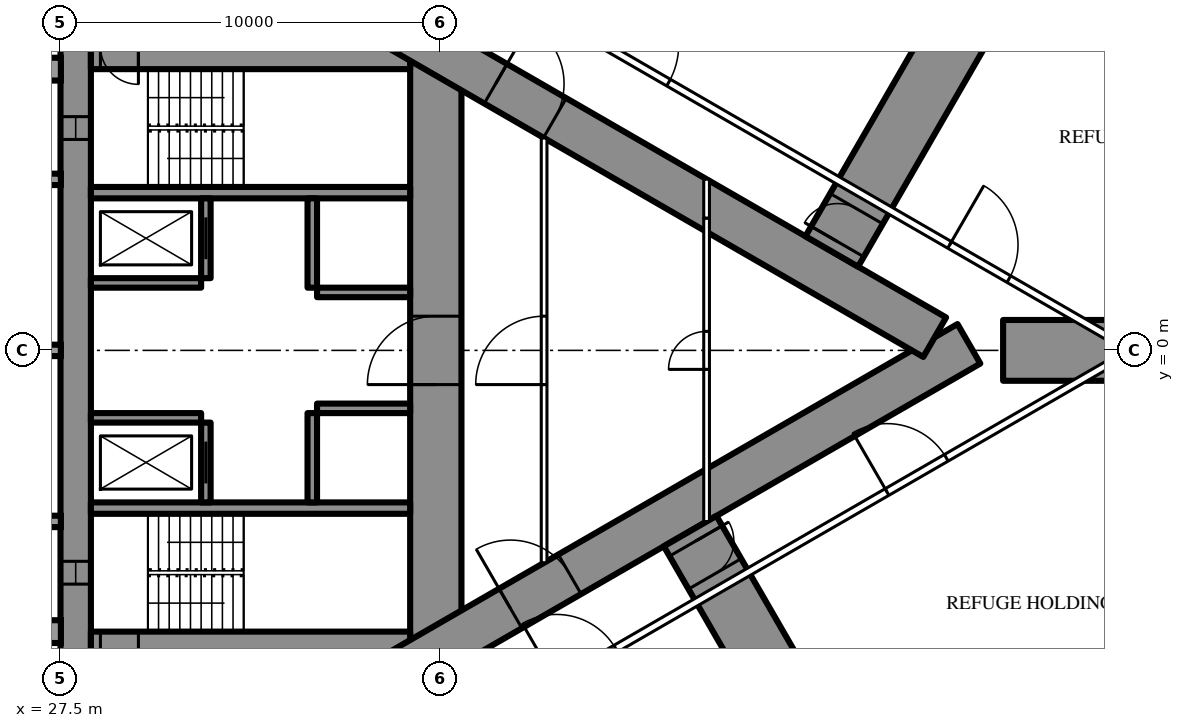
"""IFC4 building model, lengths in metres.
Left out: names, types, materials, properties, quantities, classifications, styles, units other than length and angle.
Written with IfcOpenShell. Run it as: python <this file> out.ifc"""

import sys

from ifc_helpers import new_model, si_unit, direction, frame, frame_2d, origin, place, context, subcontext, project, spatial, rectangle, extrude, element, fill, save


model = new_model("IFC4")
c1 = context("Model", 3, precision=1e-05, world=origin(), true_north=direction((0.0, 1.0)))
c2 = subcontext(c1, "Body", "Model", "MODEL_VIEW")
j1 = project(units=[si_unit("LENGTHUNIT", "METRE"), si_unit("PLANEANGLEUNIT", "RADIAN")], contexts=[c1])
p1 = place(None, origin())
s1 = spatial("IfcSite", under=j1, at=p1, CompositionType="ELEMENT")
p2 = place(p1, origin())
s2 = spatial("IfcBuilding", under=s1, at=p2, CompositionType="ELEMENT")
p3 = place(p2, frame((0.0, 0.0, 87.0)))
s3 = spatial("IfcBuildingStorey", under=s2, at=p3, CompositionType="ELEMENT", Elevation=87.0)
p4 = place(p3, frame((27.9, -8.6, 0.0), z_axis=(0.0, 0.0, 1.0), x_axis=(0.0, 1.0, 0.0)))
e1 = element("IfcWall", 1, at=p4, inside=s3, PredefinedType="SHEAR", context=c2, shape_type="SweptSolid", body=[
    extrude(rectangle(XDim=17.2, YDim=0.8, at=frame_2d((8.6, 0.0))), origin(), (0.0, 0.0, 1.0), 3.6),
])
p5 = place(p4, frame((2.45, 0.0, 0.6)))
e2 = element("IfcOpeningElement", 2, at=p5, cuts=e1, PredefinedType="OPENING", context=c2, shape_type="SweptSolid", body=[
    extrude(rectangle(XDim=0.6, YDim=2.1, at=frame_2d((0.3, 1.05))), frame((0.0, 0.41, 0.0), z_axis=(0.0, -1.0, 0.0), x_axis=(1.0, 0.0, 0.0)), (0.0, 0.0, 1.0), 0.82),
])
p6 = place(p4, frame((14.15, 0.0, 0.6)))
e3 = element("IfcOpeningElement", 3, at=p6, cuts=e1, PredefinedType="OPENING", context=c2, shape_type="SweptSolid", body=[
    extrude(rectangle(XDim=0.6, YDim=2.1, at=frame_2d((0.3, 1.05))), frame((0.0, 0.41, 0.0), z_axis=(0.0, -1.0, 0.0), x_axis=(1.0, 0.0, 0.0)), (0.0, 0.0, 1.0), 0.82),
])
p7 = place(p3, frame((37.375, -8.6, 0.0), z_axis=(0.0, 0.0, 1.0), x_axis=(0.0, 1.0, 0.0)))
e4 = element("IfcWall", 4, at=p7, inside=s3, PredefinedType="SHEAR", context=c2, shape_type="SweptSolid", body=[
    extrude(rectangle(XDim=17.2, YDim=1.35, at=frame_2d((8.6, 0.0))), origin(), (0.0, 0.0, 1.0), 3.6),
])
p8 = place(p7, frame((7.7, 0.0, 0.0)))
e5 = element("IfcOpeningElement", 5, at=p8, cuts=e4, PredefinedType="OPENING", context=c2, shape_type="SweptSolid", body=[
    extrude(rectangle(XDim=1.8, YDim=2.2, at=frame_2d((0.9, 1.1))), frame((0.0, 0.685, 0.0), z_axis=(0.0, -1.0, 0.0), x_axis=(1.0, 0.0, 0.0)), (0.0, 0.0, 1.0), 1.37),
])
p9 = place(p3, frame((28.3, -8.0, 0.0), z_axis=(0.0, 0.0, 1.0), x_axis=(1.0, 0.0, 0.0)))
e6 = element("IfcWall", 6, at=p9, inside=s3, PredefinedType="SHEAR", context=c2, shape_type="SweptSolid", body=[
    extrude(rectangle(XDim=8.4, YDim=1.2, at=frame_2d((4.2, 0.0))), origin(), (0.0, 0.0, 1.0), 3.6),
])
p10 = place(p9, frame((0.25, 0.0, 0.0)))
e7 = element("IfcOpeningElement", 7, at=p10, cuts=e6, PredefinedType="OPENING", context=c2, shape_type="SweptSolid", body=[
    extrude(rectangle(XDim=1.0, YDim=2.2, at=frame_2d((0.5, 1.1))), frame((0.0, 0.61, 0.0), z_axis=(0.0, -1.0, 0.0), x_axis=(1.0, 0.0, 0.0)), (0.0, 0.0, 1.0), 1.22),
])
p11 = place(p3, frame((28.3, 8.0, 0.0), z_axis=(0.0, 0.0, 1.0), x_axis=(1.0, 0.0, 0.0)))
e8 = element("IfcWall", 8, at=p11, inside=s3, PredefinedType="SHEAR", context=c2, shape_type="SweptSolid", body=[
    extrude(rectangle(XDim=8.4, YDim=1.2, at=frame_2d((4.2, 0.0))), origin(), (0.0, 0.0, 1.0), 3.6),
])
p12 = place(p11, frame((0.25, 0.0, 0.0)))
e9 = element("IfcOpeningElement", 9, at=p12, cuts=e8, PredefinedType="OPENING", context=c2, shape_type="SweptSolid", body=[
    extrude(rectangle(XDim=1.0, YDim=2.2, at=frame_2d((0.5, 1.1))), frame((0.0, 0.61, 0.0), z_axis=(0.0, -1.0, 0.0), x_axis=(1.0, 0.0, 0.0)), (0.0, 0.0, 1.0), 1.22),
])
for number, where, z_axis, x_axis in (
    (10, (28.3, -4.15, 0.0), (0.0, 0.0, 1.0), (1.0, 0.0, 0.0)),
    (11, (28.3, 4.15, 0.0), (0.0, 0.0, 1.0), (1.0, 0.0, 0.0)),
):
    element("IfcWall", number, at=place(p3, frame(where, z_axis=z_axis, x_axis=x_axis)), inside=s3, PredefinedType="SHEAR", context=c2, shape_type="SweptSolid", body=[
        extrude(rectangle(XDim=8.4, YDim=0.3, at=frame_2d((4.2, 0.0))), origin(), (0.0, 0.0, 1.0), 3.6),
    ])
p13 = place(p3, frame((31.325, -4.0, 0.0), z_axis=(0.0, 0.0, 1.0), x_axis=(0.0, 1.0, 0.0)))
e12 = element("IfcWall", 12, at=p13, inside=s3, PredefinedType="SHEAR", context=c2, shape_type="SweptSolid", body=[
    extrude(rectangle(XDim=2.1, YDim=0.25, at=frame_2d((1.05, 0.0))), origin(), (0.0, 0.0, 1.0), 3.6),
])
p14 = place(p13, frame((0.5, 0.0, 0.0)))
e13 = element("IfcOpeningElement", 13, at=p14, cuts=e12, PredefinedType="OPENING", context=c2, shape_type="SweptSolid", body=[
    extrude(rectangle(XDim=1.1, YDim=2.2, at=frame_2d((0.55, 1.1))), frame((0.0, 0.135, 0.0), z_axis=(0.0, -1.0, 0.0), x_axis=(1.0, 0.0, 0.0)), (0.0, 0.0, 1.0), 0.27),
])
p15 = place(p3, frame((34.125, -4.0, 0.0), z_axis=(0.0, 0.0, 1.0), x_axis=(0.0, 1.0, 0.0)))
e14 = element("IfcWall", 14, at=p15, inside=s3, PredefinedType="SHEAR", context=c2, shape_type="SweptSolid", body=[
    extrude(rectangle(XDim=2.35, YDim=0.25, at=frame_2d((1.175, 0.0))), origin(), (0.0, 0.0, 1.0), 3.6),
])
p16 = place(p3, frame((28.3, -1.775, 0.0), z_axis=(0.0, 0.0, 1.0), x_axis=(1.0, 0.0, 0.0)))
e15 = element("IfcWall", 15, at=p16, inside=s3, PredefinedType="SHEAR", context=c2, shape_type="SweptSolid", body=[
    extrude(rectangle(XDim=2.9, YDim=0.25, at=frame_2d((1.45, 0.0))), origin(), (0.0, 0.0, 1.0), 3.6),
])
p17 = place(p3, frame((34.25, -1.525, 0.0), z_axis=(0.0, 0.0, 1.0), x_axis=(1.0, 0.0, 0.0)))
e16 = element("IfcWall", 16, at=p17, inside=s3, PredefinedType="SHEAR", context=c2, shape_type="SweptSolid", body=[
    extrude(rectangle(XDim=2.45, YDim=0.25, at=frame_2d((1.225, 0.0))), origin(), (0.0, 0.0, 1.0), 3.6),
])
p18 = place(p3, frame((31.325, 1.9, 0.0), z_axis=(0.0, 0.0, 1.0), x_axis=(0.0, 1.0, 0.0)))
e17 = element("IfcWall", 17, at=p18, inside=s3, PredefinedType="SHEAR", context=c2, shape_type="SweptSolid", body=[
    extrude(rectangle(XDim=2.1, YDim=0.25, at=frame_2d((1.05, 0.0))), origin(), (0.0, 0.0, 1.0), 3.6),
])
p19 = place(p18, frame((0.5, 0.0, 0.0)))
e18 = element("IfcOpeningElement", 18, at=p19, cuts=e17, PredefinedType="OPENING", context=c2, shape_type="SweptSolid", body=[
    extrude(rectangle(XDim=1.1, YDim=2.2, at=frame_2d((0.55, 1.1))), frame((0.0, 0.135, 0.0), z_axis=(0.0, -1.0, 0.0), x_axis=(1.0, 0.0, 0.0)), (0.0, 0.0, 1.0), 0.27),
])
p20 = place(p3, frame((34.125, 1.65, 0.0), z_axis=(0.0, 0.0, 1.0), x_axis=(0.0, 1.0, 0.0)))
e19 = element("IfcWall", 19, at=p20, inside=s3, PredefinedType="SHEAR", context=c2, shape_type="SweptSolid", body=[
    extrude(rectangle(XDim=2.35, YDim=0.25, at=frame_2d((1.175, 0.0))), origin(), (0.0, 0.0, 1.0), 3.6),
])
p21 = place(p3, frame((28.3, 1.775, 0.0), z_axis=(0.0, 0.0, 1.0), x_axis=(1.0, 0.0, 0.0)))
e20 = element("IfcWall", 20, at=p21, inside=s3, PredefinedType="SHEAR", context=c2, shape_type="SweptSolid", body=[
    extrude(rectangle(XDim=2.9, YDim=0.25, at=frame_2d((1.45, 0.0))), origin(), (0.0, 0.0, 1.0), 3.6),
])
p22 = place(p3, frame((34.25, 1.525, 0.0), z_axis=(0.0, 0.0, 1.0), x_axis=(1.0, 0.0, 0.0)))
e21 = element("IfcWall", 21, at=p22, inside=s3, PredefinedType="SHEAR", context=c2, shape_type="SweptSolid", body=[
    extrude(rectangle(XDim=2.45, YDim=0.25, at=frame_2d((1.225, 0.0))), origin(), (0.0, 0.0, 1.0), 3.6),
])
p23 = place(p3, frame((27.2, -13.8, 0.0), z_axis=(0.0, 0.0, 1.0), x_axis=(0.866027159892, 0.499996958321, 0.0)))
e22 = element("IfcWall", 22, at=p23, inside=s3, PredefinedType="SHEAR", context=c2, shape_type="SweptSolid", body=[
    extrude(rectangle(XDim=27.947, YDim=1.2, at=frame_2d((13.973, 0.0))), origin(), (0.0, 0.0, 1.0), 3.6),
])
p24 = place(p23, frame((4.6, 0.0, 0.0)))
e23 = element("IfcOpeningElement", 23, at=p24, cuts=e22, PredefinedType="OPENING", context=c2, shape_type="SweptSolid", body=[
    extrude(rectangle(XDim=1.0, YDim=2.2, at=frame_2d((0.5, 1.1))), frame((0.0, 0.61, 0.0), z_axis=(0.0, -1.0, 0.0), x_axis=(1.0, 0.0, 0.0)), (0.0, 0.0, 1.0), 1.22),
])
p25 = place(p23, frame((14.018, 0.0, 0.0)))
e24 = element("IfcOpeningElement", 24, at=p25, cuts=e22, PredefinedType="OPENING", context=c2, shape_type="SweptSolid", body=[
    extrude(rectangle(XDim=1.8, YDim=2.2, at=frame_2d((0.9, 1.1))), frame((0.0, 0.61, 0.0), z_axis=(0.0, -1.0, 0.0), x_axis=(1.0, 0.0, 0.0)), (0.0, 0.0, 1.0), 1.22),
])
p26 = place(p3, frame((27.2, 13.8, 0.0), z_axis=(0.0, 0.0, 1.0), x_axis=(0.866024515034, -0.500001539357, 0.0)))
e25 = element("IfcWall", 25, at=p26, inside=s3, PredefinedType="SHEAR", context=c2, shape_type="SweptSolid", body=[
    extrude(rectangle(XDim=26.907, YDim=1.2, at=frame_2d((13.454, 0.0))), origin(), (0.0, 0.0, 1.0), 3.6),
])
p27 = place(p26, frame((5.95, 0.0, 0.0)))
e26 = element("IfcOpeningElement", 26, at=p27, cuts=e25, PredefinedType="OPENING", context=c2, shape_type="SweptSolid", body=[
    extrude(rectangle(XDim=1.0, YDim=2.2, at=frame_2d((0.5, 1.1))), frame((0.0, 0.61, 0.0), z_axis=(0.0, -1.0, 0.0), x_axis=(1.0, 0.0, 0.0)), (0.0, 0.0, 1.0), 1.22),
])
p28 = place(p26, frame((13.568, 0.0, 0.0)))
e27 = element("IfcOpeningElement", 27, at=p28, cuts=e25, PredefinedType="OPENING", context=c2, shape_type="SweptSolid", body=[
    extrude(rectangle(XDim=1.8, YDim=2.03, at=frame_2d((0.9, 1.015))), frame((0.0, 0.61, 0.0), z_axis=(0.0, -1.0, 0.0), x_axis=(1.0, 0.0, 0.0)), (0.0, 0.0, 1.0), 1.22),
])
p29 = place(p3, frame((44.067, -4.754, 0.0), z_axis=(0.0, 0.0, 1.0), x_axis=(0.499987574995, -0.866032577246, 0.0)))
e28 = element("IfcWall", 28, at=p29, inside=s3, PredefinedType="SHEAR", context=c2, shape_type="SweptSolid", body=[
    extrude(rectangle(XDim=11.824, YDim=1.6, at=frame_2d((5.912, 0.0))), origin(), (0.0, 0.0, 1.0), 3.6),
])
p30 = place(p29, frame((0.3, 0.0, 0.0)))
e29 = element("IfcOpeningElement", 29, at=p30, cuts=e28, PredefinedType="OPENING", context=c2, shape_type="SweptSolid", body=[
    extrude(rectangle(XDim=1.0, YDim=2.2, at=frame_2d((0.5, 1.1))), frame((0.0, 0.81, 0.0), z_axis=(0.0, -1.0, 0.0), x_axis=(1.0, 0.0, 0.0)), (0.0, 0.0, 1.0), 1.62),
])
p31 = place(p3, frame((52.302, 0.0, 0.0), z_axis=(0.0, 0.0, 1.0), x_axis=(1.0, 0.0, 0.0)))
e30 = element("IfcWall", 30, at=p31, inside=s3, PredefinedType="SHEAR", context=c2, shape_type="SweptSolid", body=[
    extrude(rectangle(XDim=9.198, YDim=1.6, at=frame_2d((4.599, 0.0))), origin(), (0.0, 0.0, 1.0), 3.6),
])
p32 = place(p3, frame((47.794, 2.603, 0.0), z_axis=(0.0, 0.0, 1.0), x_axis=(0.499993342329, 0.866029247559, 0.0)))
e31 = element("IfcWall", 31, at=p32, inside=s3, PredefinedType="SHEAR", context=c2, shape_type="SweptSolid", body=[
    extrude(rectangle(XDim=11.806, YDim=1.6, at=frame_2d((5.903, 0.0))), origin(), (0.0, 0.0, 1.0), 3.6),
])
p33 = place(p32, frame((0.3, 0.0, 0.0)))
e32 = element("IfcOpeningElement", 32, at=p33, cuts=e31, PredefinedType="OPENING", context=c2, shape_type="SweptSolid", body=[
    extrude(rectangle(XDim=1.0, YDim=2.2, at=frame_2d((0.5, 1.1))), frame((0.0, 0.81, 0.0), z_axis=(0.0, -1.0, 0.0), x_axis=(1.0, 0.0, 0.0)), (0.0, 0.0, 1.0), 1.62),
])
p34 = place(p3, frame((49.979, -14.994, 0.0), z_axis=(0.0, 0.0, 1.0), x_axis=(0.849312372751, 0.527890607505, 0.0)))
e33 = element("IfcWall", 33, at=p34, inside=s3, PredefinedType="SHEAR", context=c2, shape_type="SweptSolid", body=[
    extrude(rectangle(XDim=12.906, YDim=1.4, at=frame_2d((6.453, 0.0))), origin(), (0.0, 0.0, 1.0), 3.6),
])
p35 = place(p34, frame((4.953, 0.0, 0.6)))
e34 = element("IfcOpeningElement", 34, at=p35, cuts=e33, PredefinedType="OPENING", context=c2, shape_type="SweptSolid", body=[
    extrude(rectangle(XDim=3.0, YDim=1.2, at=frame_2d((1.5, 0.6))), frame((0.0, 0.71, 0.0), z_axis=(0.0, -1.0, 0.0), x_axis=(1.0, 0.0, 0.0)), (0.0, 0.0, 1.0), 1.42),
])
p36 = place(p3, frame((60.941, 8.181, 0.0), z_axis=(0.0, 0.0, 1.0), x_axis=(-0.841727408736, 0.539902740669, 0.0)))
e35 = element("IfcWall", 35, at=p36, inside=s3, PredefinedType="SHEAR", context=c2, shape_type="SweptSolid", body=[
    extrude(rectangle(XDim=8.606, YDim=1.4, at=frame_2d((4.303, 0.0))), origin(), (0.0, 0.0, 1.0), 3.6),
])
p37 = place(p36, frame((2.803, 0.0, 0.6)))
e36 = element("IfcOpeningElement", 36, at=p37, cuts=e35, PredefinedType="OPENING", context=c2, shape_type="SweptSolid", body=[
    extrude(rectangle(XDim=3.0, YDim=1.2, at=frame_2d((1.5, 0.6))), frame((0.0, 0.71, 0.0), z_axis=(0.0, -1.0, 0.0), x_axis=(1.0, 0.0, 0.0)), (0.0, 0.0, 1.0), 1.42),
])
p38 = place(p3, frame((37.96, -10.243, 0.0), z_axis=(0.0, 0.0, 1.0), x_axis=(0.866026429433, 0.499998223521, 0.0)))
e37 = element("IfcWall", 37, at=p38, inside=s3, PredefinedType="PARTITIONING", context=c2, shape_type="SweptSolid", body=[
    extrude(rectangle(XDim=20.487, YDim=0.2, at=frame_2d((10.243, 0.0))), origin(), (0.0, 0.0, 1.0), 3.35),
])
p39 = place(p38, frame((13.034, 0.0, 0.0)))
e38 = element("IfcOpeningElement", 38, at=p39, cuts=e37, PredefinedType="OPENING", context=c2, shape_type="SweptSolid", body=[
    extrude(rectangle(XDim=1.8, YDim=2.2, at=frame_2d((0.9, 1.1))), frame((0.0, 0.11, 0.0), z_axis=(0.0, -1.0, 0.0), x_axis=(1.0, 0.0, 0.0)), (0.0, 0.0, 1.0), 0.22),
])
p40 = place(p38, frame((2.992, 0.0, 0.0)))
e39 = element("IfcOpeningElement", 39, at=p40, cuts=e37, PredefinedType="OPENING", context=c2, shape_type="SweptSolid", body=[
    extrude(rectangle(XDim=1.8, YDim=2.2, at=frame_2d((0.9, 1.1))), frame((0.0, 0.11, 0.0), z_axis=(0.0, -1.0, 0.0), x_axis=(1.0, 0.0, 0.0)), (0.0, 0.0, 1.0), 0.22),
])
p41 = place(p3, frame((36.834, 10.894, 0.0), z_axis=(0.0, 0.0, 1.0), x_axis=(0.866028157229, -0.499995230863, 0.0)))
e40 = element("IfcWall", 40, at=p41, inside=s3, PredefinedType="PARTITIONING", context=c2, shape_type="SweptSolid", body=[
    extrude(rectangle(XDim=21.667, YDim=0.2, at=frame_2d((10.833, 0.0))), origin(), (0.0, 0.0, 1.0), 3.35),
])
p42 = place(p41, frame((16.236, 0.0, 0.0)))
e41 = element("IfcOpeningElement", 41, at=p42, cuts=e40, PredefinedType="OPENING", context=c2, shape_type="SweptSolid", body=[
    extrude(rectangle(XDim=1.8, YDim=2.2, at=frame_2d((0.9, 1.1))), frame((0.0, 0.11, 0.0), z_axis=(0.0, -1.0, 0.0), x_axis=(1.0, 0.0, 0.0)), (0.0, 0.0, 1.0), 0.22),
])
p43 = place(p41, frame((5.696, 0.0, 0.0)))
e42 = element("IfcOpeningElement", 42, at=p43, cuts=e40, PredefinedType="OPENING", context=c2, shape_type="SweptSolid", body=[
    extrude(rectangle(XDim=2.0, YDim=2.4, at=frame_2d((1.0, 1.2))), frame((0.0, 0.11, 0.0), z_axis=(0.0, -1.0, 0.0), x_axis=(1.0, 0.0, 0.0)), (0.0, 0.0, 1.0), 0.22),
])
p44 = place(p3, frame((40.225, -5.587, 0.0), z_axis=(0.0, 0.0, 1.0), x_axis=(0.0, 1.0, 0.0)))
e43 = element("IfcWall", 43, at=p44, inside=s3, PredefinedType="PARTITIONING", context=c2, shape_type="SweptSolid", body=[
    extrude(rectangle(XDim=11.174, YDim=0.15, at=frame_2d((5.587, 0.0))), origin(), (0.0, 0.0, 1.0), 3.35),
])
p45 = place(p44, frame((4.687, 0.0, 0.0)))
e44 = element("IfcOpeningElement", 44, at=p45, cuts=e43, PredefinedType="OPENING", context=c2, shape_type="SweptSolid", body=[
    extrude(rectangle(XDim=1.8, YDim=2.2, at=frame_2d((0.9, 1.1))), frame((0.0, 0.085, 0.0), z_axis=(0.0, -1.0, 0.0), x_axis=(1.0, 0.0, 0.0)), (0.0, 0.0, 1.0), 0.17),
])
p46 = place(p3, frame((44.5, -4.505, 0.0), z_axis=(0.0, 0.0, 1.0), x_axis=(0.0, 1.0, 0.0)))
e45 = element("IfcWall", 45, at=p46, inside=s3, PredefinedType="PARTITIONING", context=c2, shape_type="SweptSolid", body=[
    extrude(rectangle(XDim=7.986, YDim=0.15, at=frame_2d((3.993, 0.0))), origin(), (0.0, 0.0, 1.0), 3.35),
])
p47 = place(p46, frame((4.005, 0.0, 0.0)))
e46 = element("IfcOpeningElement", 46, at=p47, cuts=e45, PredefinedType="OPENING", context=c2, shape_type="SweptSolid", body=[
    extrude(rectangle(XDim=1.0, YDim=2.2, at=frame_2d((0.5, 1.1))), frame((0.0, 0.085, 0.0), z_axis=(0.0, -1.0, 0.0), x_axis=(1.0, 0.0, 0.0)), (0.0, 0.0, 1.0), 0.17),
])
p48 = place(p3, frame((44.5, 3.481, 0.0), z_axis=(0.0, 0.0, 1.0), x_axis=(0.0, 1.0, 0.0)))
e47 = element("IfcWall", 47, at=p48, inside=s3, PredefinedType="PARTITIONING", context=c2, shape_type="SweptSolid", body=[
    extrude(rectangle(XDim=1.023, YDim=0.15, at=frame_2d((0.512, 0.0))), origin(), (0.0, 0.0, 1.0), 2.05),
])
p49 = place(p30, origin())
e48 = element("IfcDoor", 48, at=p49, inside=s3, OperationType="SINGLE_SWING_LEFT", PredefinedType="DOOR", context=c2, shape_type="SweptSolid", body=[
    extrude(rectangle(XDim=1.0, YDim=2.2, at=frame_2d((0.5, 1.1))), frame((0.0, 0.025, 0.0), z_axis=(0.0, -1.0, 0.0), x_axis=(1.0, 0.0, 0.0)), (0.0, 0.0, 1.0), 0.05),
])
fill(e29, e48)
p50 = place(p33, origin())
e49 = element("IfcDoor", 49, at=p50, inside=s3, OperationType="SINGLE_SWING_LEFT", PredefinedType="DOOR", context=c2, shape_type="SweptSolid", body=[
    extrude(rectangle(XDim=1.0, YDim=2.2, at=frame_2d((0.5, 1.1))), frame((0.0, 0.025, 0.0), z_axis=(0.0, -1.0, 0.0), x_axis=(1.0, 0.0, 0.0)), (0.0, 0.0, 1.0), 0.05),
])
fill(e32, e49)
p51 = place(p39, origin())
e50 = element("IfcDoor", 50, at=p51, inside=s3, OperationType="DOUBLE_DOOR_SINGLE_SWING", PredefinedType="DOOR", context=c2, shape_type="SweptSolid", body=[
    extrude(rectangle(XDim=1.8, YDim=2.2, at=frame_2d((0.9, 1.1))), frame((0.0, 0.025, 0.0), z_axis=(0.0, -1.0, 0.0), x_axis=(1.0, 0.0, 0.0)), (0.0, 0.0, 1.0), 0.05),
])
fill(e38, e50)
p52 = place(p42, origin())
e51 = element("IfcDoor", 51, at=p52, inside=s3, OperationType="DOUBLE_DOOR_SINGLE_SWING", PredefinedType="DOOR", context=c2, shape_type="SweptSolid", body=[
    extrude(rectangle(XDim=1.8, YDim=2.2, at=frame_2d((0.9, 1.1))), frame((0.0, 0.025, 0.0), z_axis=(0.0, -1.0, 0.0), x_axis=(1.0, 0.0, 0.0)), (0.0, 0.0, 1.0), 0.05),
])
fill(e41, e51)
p53 = place(p43, origin())
e52 = element("IfcDoor", 52, at=p53, inside=s3, OperationType="DOUBLE_DOOR_SINGLE_SWING", PredefinedType="DOOR", context=c2, shape_type="SweptSolid", body=[
    extrude(rectangle(XDim=2.0, YDim=2.4, at=frame_2d((1.0, 1.2))), frame((0.0, 0.025, 0.0), z_axis=(0.0, -1.0, 0.0), x_axis=(1.0, 0.0, 0.0)), (0.0, 0.0, 1.0), 0.05),
])
fill(e42, e52)
p54 = place(p40, origin())
e53 = element("IfcDoor", 53, at=p54, inside=s3, OperationType="DOUBLE_DOOR_SINGLE_SWING", PredefinedType="DOOR", context=c2, shape_type="SweptSolid", body=[
    extrude(rectangle(XDim=1.8, YDim=2.2, at=frame_2d((0.9, 1.1))), frame((0.0, 0.025, 0.0), z_axis=(0.0, -1.0, 0.0), x_axis=(1.0, 0.0, 0.0)), (0.0, 0.0, 1.0), 0.05),
])
fill(e39, e53)
p55 = place(p45, origin())
e54 = element("IfcDoor", 54, at=p55, inside=s3, OperationType="DOUBLE_DOOR_SINGLE_SWING", PredefinedType="DOOR", context=c2, shape_type="SweptSolid", body=[
    extrude(rectangle(XDim=1.8, YDim=2.2, at=frame_2d((0.9, 1.1))), frame((0.0, 0.025, 0.0), z_axis=(0.0, -1.0, 0.0), x_axis=(1.0, 0.0, 0.0)), (0.0, 0.0, 1.0), 0.05),
])
fill(e44, e54)
p56 = place(p47, origin())
e55 = element("IfcDoor", 55, at=p56, inside=s3, OperationType="SINGLE_SWING_LEFT", PredefinedType="DOOR", context=c2, shape_type="SweptSolid", body=[
    extrude(rectangle(XDim=1.0, YDim=2.2, at=frame_2d((0.5, 1.1))), frame((0.0, 0.025, 0.0), z_axis=(0.0, -1.0, 0.0), x_axis=(1.0, 0.0, 0.0)), (0.0, 0.0, 1.0), 0.05),
])
fill(e46, e55)
p57 = place(p25, origin())
e56 = element("IfcDoor", 56, at=p57, inside=s3, OperationType="DOUBLE_DOOR_SINGLE_SWING", PredefinedType="DOOR", context=c2, shape_type="SweptSolid", body=[
    extrude(rectangle(XDim=1.8, YDim=2.2, at=frame_2d((0.9, 1.1))), frame((0.0, 0.025, 0.0), z_axis=(0.0, -1.0, 0.0), x_axis=(1.0, 0.0, 0.0)), (0.0, 0.0, 1.0), 0.05),
])
fill(e24, e56)
p58 = place(p28, origin())
e57 = element("IfcDoor", 57, at=p58, inside=s3, OperationType="DOUBLE_DOOR_SINGLE_SWING", PredefinedType="DOOR", context=c2, shape_type="SweptSolid", body=[
    extrude(rectangle(XDim=1.8, YDim=2.03, at=frame_2d((0.9, 1.015))), frame((0.0, 0.025, 0.0), z_axis=(0.0, -1.0, 0.0), x_axis=(1.0, 0.0, 0.0)), (0.0, 0.0, 1.0), 0.05),
])
fill(e27, e57)
p59 = place(p8, origin())
e58 = element("IfcDoor", 58, at=p59, inside=s3, OperationType="DOUBLE_DOOR_SINGLE_SWING", PredefinedType="DOOR", context=c2, shape_type="SweptSolid", body=[
    extrude(rectangle(XDim=1.8, YDim=2.2, at=frame_2d((0.9, 1.1))), frame((0.0, 0.025, 0.0), z_axis=(0.0, -1.0, 0.0), x_axis=(1.0, 0.0, 0.0)), (0.0, 0.0, 1.0), 0.05),
])
fill(e5, e58)
p60 = place(p14, origin())
e59 = element("IfcDoor", 59, at=p60, inside=s3, OperationType="SLIDING_TO_LEFT", PredefinedType="USERDEFINED", context=c2, shape_type="SweptSolid", body=[
    extrude(rectangle(XDim=1.1, YDim=2.2, at=frame_2d((0.55, 1.1))), frame((0.0, 0.025, 0.0), z_axis=(0.0, -1.0, 0.0), x_axis=(1.0, 0.0, 0.0)), (0.0, 0.0, 1.0), 0.05),
])
fill(e13, e59)
p61 = place(p19, origin())
e60 = element("IfcDoor", 60, at=p61, inside=s3, OperationType="SLIDING_TO_LEFT", PredefinedType="USERDEFINED", context=c2, shape_type="SweptSolid", body=[
    extrude(rectangle(XDim=1.1, YDim=2.2, at=frame_2d((0.55, 1.1))), frame((0.0, 0.025, 0.0), z_axis=(0.0, -1.0, 0.0), x_axis=(1.0, 0.0, 0.0)), (0.0, 0.0, 1.0), 0.05),
])
fill(e18, e60)
p62 = place(p5, origin())
e61 = element("IfcWindow", 61, at=p62, inside=s3, PartitioningType="SINGLE_PANEL", PredefinedType="WINDOW", context=c2, shape_type="SweptSolid", body=[
    extrude(rectangle(XDim=0.6, YDim=2.1, at=frame_2d((0.3, 1.05))), frame((0.0, 0.03, 0.0), z_axis=(0.0, -1.0, 0.0), x_axis=(1.0, 0.0, 0.0)), (0.0, 0.0, 1.0), 0.06),
])
fill(e2, e61)
p63 = place(p6, origin())
e62 = element("IfcWindow", 62, at=p63, inside=s3, PartitioningType="SINGLE_PANEL", PredefinedType="WINDOW", context=c2, shape_type="SweptSolid", body=[
    extrude(rectangle(XDim=0.6, YDim=2.1, at=frame_2d((0.3, 1.05))), frame((0.0, 0.03, 0.0), z_axis=(0.0, -1.0, 0.0), x_axis=(1.0, 0.0, 0.0)), (0.0, 0.0, 1.0), 0.06),
])
fill(e3, e62)
save(model, sys.argv[1])
